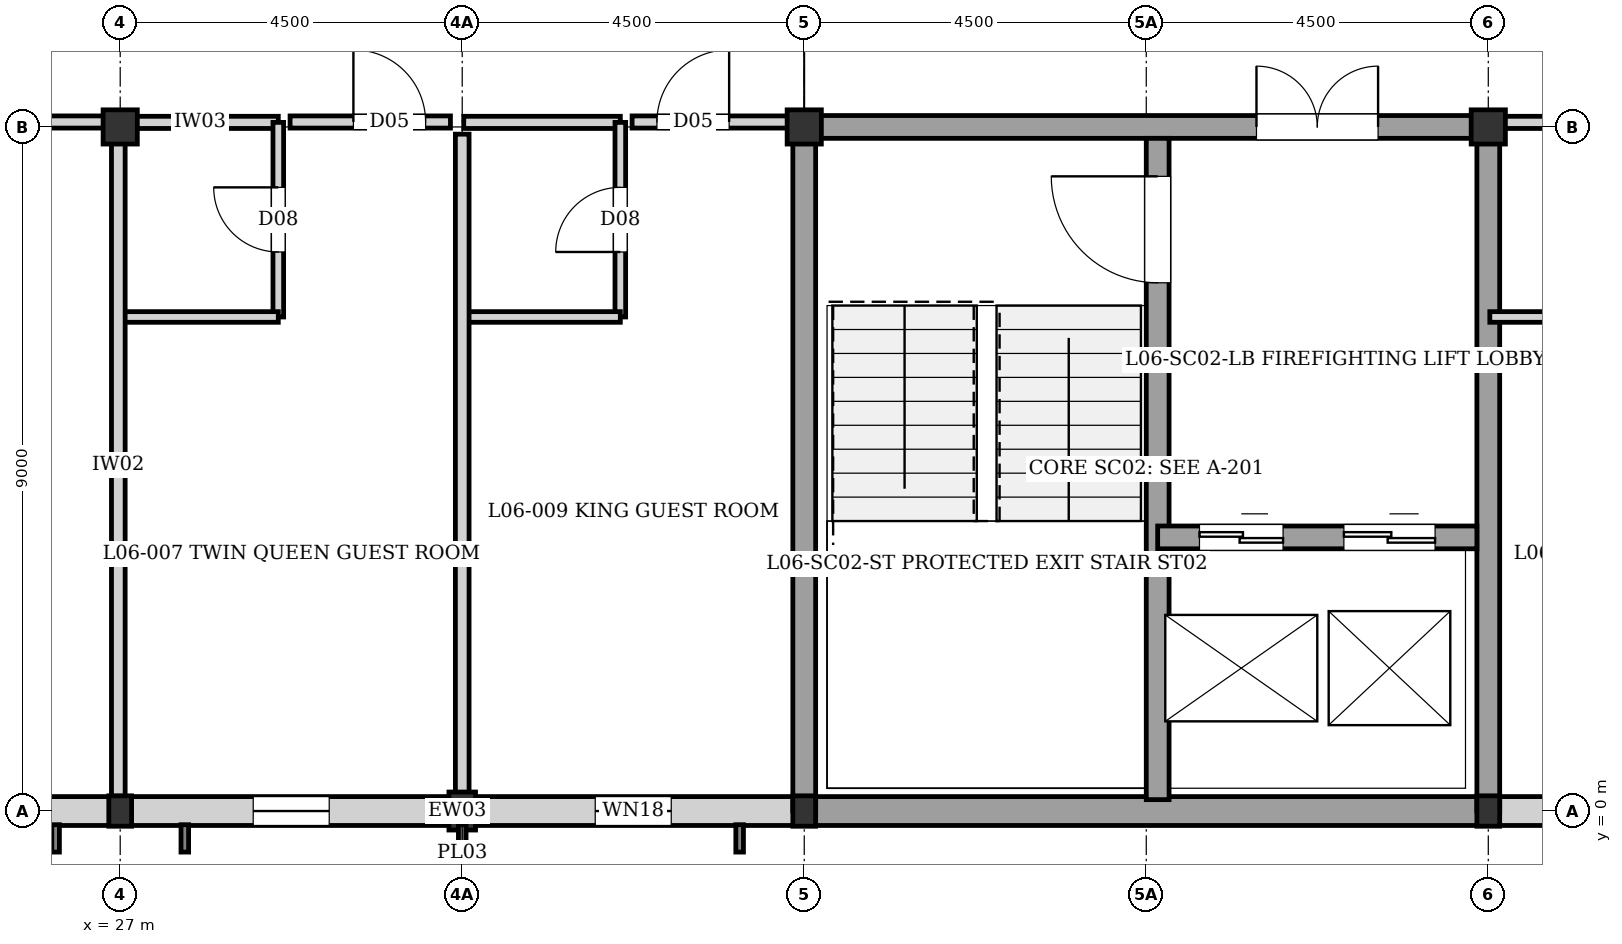
"""IFC4 building model, lengths in metres.
Left out: names, types, materials, properties, quantities, classifications, styles, units other than length and angle.
Written with IfcOpenShell. Run it as: python <this file> out.ifc"""

import sys

from ifc_helpers import new_model, si_unit, direction, frame, frame_2d, origin, origin_2d, place, context, subcontext, project, spatial, rectangle, i_section, extrude, element, fill, save


model = new_model("IFC4")
c1 = context("Model", 3, precision=1e-05, world=origin(), true_north=direction((0.0, 1.0)))
c2 = subcontext(c1, "Body", "Model", "MODEL_VIEW")
j1 = project(units=[si_unit("LENGTHUNIT", "METRE"), si_unit("PLANEANGLEUNIT", "RADIAN")], contexts=[c1])
p1 = place(None, origin())
s1 = spatial("IfcSite", under=j1, at=p1, CompositionType="ELEMENT")
p2 = place(p1, origin())
s2 = spatial("IfcBuilding", under=s1, at=p2, CompositionType="ELEMENT")
p3 = place(p2, frame((0.0, 0.0, 20.64)))
s3 = spatial("IfcBuildingStorey", under=s2, at=p3, CompositionType="ELEMENT", Elevation=20.64)
p4 = place(p3, frame((27.0, 0.0, 0.0), z_axis=(0.0, 0.0, 1.0), x_axis=(1.0, 0.0, 0.0)))
e1 = element("IfcColumn", 1, at=p4, inside=s3, PredefinedType="COLUMN", context=c2, shape_type="SweptSolid", body=[
    extrude(i_section(OverallWidth=0.3, OverallDepth=0.4, WebThickness=0.013, FlangeThickness=0.024, at=origin_2d()), origin(), (0.0, 0.0, 1.0), 3.04),
])
p5 = place(p3, frame((27.0, 9.0, 0.0), z_axis=(0.0, 0.0, 1.0), x_axis=(1.0, 0.0, 0.0)))
e2 = element("IfcColumn", 2, at=p5, inside=s3, PredefinedType="COLUMN", context=c2, shape_type="SweptSolid", body=[
    extrude(rectangle(XDim=0.45, YDim=0.45, at=origin_2d()), origin(), (0.0, 0.0, 1.0), 3.04),
])
p6 = place(p3, frame((36.0, 0.0, 0.0), z_axis=(0.0, 0.0, 1.0), x_axis=(1.0, 0.0, 0.0)))
e3 = element("IfcColumn", 3, at=p6, inside=s3, PredefinedType="COLUMN", context=c2, shape_type="SweptSolid", body=[
    extrude(i_section(OverallWidth=0.3, OverallDepth=0.4, WebThickness=0.013, FlangeThickness=0.024, at=origin_2d()), origin(), (0.0, 0.0, 1.0), 3.04),
])
p7 = place(p3, frame((36.0, 9.0, 0.0), z_axis=(0.0, 0.0, 1.0), x_axis=(1.0, 0.0, 0.0)))
e4 = element("IfcColumn", 4, at=p7, inside=s3, PredefinedType="COLUMN", context=c2, shape_type="SweptSolid", body=[
    extrude(rectangle(XDim=0.45, YDim=0.45, at=origin_2d()), origin(), (0.0, 0.0, 1.0), 3.04),
])
p8 = place(p3, frame((45.0, 0.0, 0.0), z_axis=(0.0, 0.0, 1.0), x_axis=(1.0, 0.0, 0.0)))
e5 = element("IfcColumn", 5, at=p8, inside=s3, PredefinedType="COLUMN", context=c2, shape_type="SweptSolid", body=[
    extrude(i_section(OverallWidth=0.3, OverallDepth=0.4, WebThickness=0.013, FlangeThickness=0.024, at=origin_2d()), origin(), (0.0, 0.0, 1.0), 3.04),
])
p9 = place(p3, frame((45.0, 9.0, 0.0), z_axis=(0.0, 0.0, 1.0), x_axis=(1.0, 0.0, 0.0)))
e6 = element("IfcColumn", 6, at=p9, inside=s3, PredefinedType="COLUMN", context=c2, shape_type="SweptSolid", body=[
    extrude(rectangle(XDim=0.45, YDim=0.45, at=origin_2d()), origin(), (0.0, 0.0, 1.0), 3.04),
])
p10 = place(p3, frame((31.5, 0.0, 0.0), z_axis=(0.0, 0.0, 1.0), x_axis=(1.0, 0.0, 0.0)))
e7 = element("IfcColumn", 7, at=p10, inside=s3, PredefinedType="PILASTER", context=c2, shape_type="SweptSolid", body=[
    extrude(rectangle(XDim=0.35, YDim=0.5, at=origin_2d()), origin(), (0.0, 0.0, 1.0), 3.04),
])
p11 = place(p3, frame((53.87, 0.0, 0.0), z_axis=(0.0, 0.0, 1.0), x_axis=(-1.0, 0.0, 0.0)))
e8 = element("IfcWall", 8, at=p11, inside=s3, PredefinedType="SOLIDWALL", context=c2, shape_type="SweptSolid", body=[
    extrude(rectangle(XDim=8.74, YDim=0.38, at=frame_2d((4.37, 0.0))), origin(), (0.0, 0.0, 1.0), 2.48),
])
p12 = place(p11, frame((1.62, 0.0, 0.35)))
e9 = element("IfcOpeningElement", 9, at=p12, cuts=e8, PredefinedType="OPENING", context=c2, shape_type="SweptSolid", body=[
    extrude(rectangle(XDim=1.0, YDim=1.6, at=frame_2d((0.5, 0.8))), frame((0.0, 0.2, 0.0), z_axis=(0.0, -1.0, 0.0), x_axis=(1.0, 0.0, 0.0)), (0.0, 0.0, 1.0), 0.4),
])
p13 = place(p11, frame((6.12, 0.0, 0.35)))
e10 = element("IfcOpeningElement", 10, at=p13, cuts=e8, PredefinedType="OPENING", context=c2, shape_type="SweptSolid", body=[
    extrude(rectangle(XDim=1.0, YDim=1.6, at=frame_2d((0.5, 0.8))), frame((0.0, 0.2, 0.0), z_axis=(0.0, -1.0, 0.0), x_axis=(1.0, 0.0, 0.0)), (0.0, 0.0, 1.0), 0.4),
])
p14 = place(p3, frame((45.0, 0.0, 0.0), z_axis=(0.0, 0.0, 1.0), x_axis=(-1.0, 0.0, 0.0)))
e11 = element("IfcWall", 11, at=p14, inside=s3, PredefinedType="SOLIDWALL", context=c2, shape_type="SweptSolid", body=[
    extrude(rectangle(XDim=9.0, YDim=0.38, at=frame_2d((4.5, 0.0))), origin(), (0.0, 0.0, 1.0), 2.82),
])
p15 = place(p3, frame((35.87, 0.0, 0.0), z_axis=(0.0, 0.0, 1.0), x_axis=(-1.0, 0.0, 0.0)))
e12 = element("IfcWall", 12, at=p15, inside=s3, PredefinedType="SOLIDWALL", context=c2, shape_type="SweptSolid", body=[
    extrude(rectangle(XDim=8.87, YDim=0.38, at=frame_2d((4.435, 0.0))), origin(), (0.0, 0.0, 1.0), 2.38),
])
p16 = place(p15, frame((1.62, 0.0, 0.35)))
e13 = element("IfcOpeningElement", 13, at=p16, cuts=e12, PredefinedType="OPENING", context=c2, shape_type="SweptSolid", body=[
    extrude(rectangle(XDim=1.0, YDim=1.6, at=frame_2d((0.5, 0.8))), frame((0.0, 0.2, 0.0), z_axis=(0.0, -1.0, 0.0), x_axis=(1.0, 0.0, 0.0)), (0.0, 0.0, 1.0), 0.4),
])
p17 = place(p15, frame((6.12, 0.0, 0.35)))
e14 = element("IfcOpeningElement", 14, at=p17, cuts=e12, PredefinedType="OPENING", context=c2, shape_type="SweptSolid", body=[
    extrude(rectangle(XDim=1.0, YDim=1.6, at=frame_2d((0.5, 0.8))), frame((0.0, 0.2, 0.0), z_axis=(0.0, -1.0, 0.0), x_axis=(1.0, 0.0, 0.0)), (0.0, 0.0, 1.0), 0.4),
])
p18 = place(p3, frame((27.0, 0.0, 0.0), z_axis=(0.0, 0.0, 1.0), x_axis=(-1.0, 0.0, 0.0)))
e15 = element("IfcWall", 15, at=p18, inside=s3, PredefinedType="SOLIDWALL", context=c2, shape_type="SweptSolid", body=[
    extrude(rectangle(XDim=8.87, YDim=0.38, at=frame_2d((4.435, 0.0))), origin(), (0.0, 0.0, 1.0), 2.42),
])
p19 = place(p18, frame((1.75, 0.0, 0.35)))
e16 = element("IfcOpeningElement", 16, at=p19, cuts=e15, PredefinedType="OPENING", context=c2, shape_type="SweptSolid", body=[
    extrude(rectangle(XDim=1.0, YDim=1.6, at=frame_2d((0.5, 0.8))), frame((0.0, 0.2, 0.0), z_axis=(0.0, -1.0, 0.0), x_axis=(1.0, 0.0, 0.0)), (0.0, 0.0, 1.0), 0.4),
])
p20 = place(p18, frame((6.25, 0.0, 0.35)))
e17 = element("IfcOpeningElement", 17, at=p20, cuts=e15, PredefinedType="OPENING", context=c2, shape_type="SweptSolid", body=[
    extrude(rectangle(XDim=1.0, YDim=1.6, at=frame_2d((0.5, 0.8))), frame((0.0, 0.2, 0.0), z_axis=(0.0, -1.0, 0.0), x_axis=(1.0, 0.0, 0.0)), (0.0, 0.0, 1.0), 0.4),
])
p21 = place(p3, frame((45.0, 0.0, 0.0), z_axis=(0.0, 0.0, 1.0), x_axis=(0.0, 1.0, 0.0)))
e18 = element("IfcWall", 18, at=p21, inside=s3, PredefinedType="SHEAR", context=c2, shape_type="SweptSolid", body=[
    extrude(rectangle(XDim=9.0, YDim=0.3, at=frame_2d((4.5, 0.0))), origin(), (0.0, 0.0, 1.0), 2.82),
])
p22 = place(p3, frame((36.0, 9.0, 0.0), z_axis=(0.0, 0.0, 1.0), x_axis=(1.0, 0.0, 0.0)))
e19 = element("IfcWall", 19, at=p22, inside=s3, PredefinedType="SHEAR", context=c2, shape_type="SweptSolid", body=[
    extrude(rectangle(XDim=9.0, YDim=0.3, at=frame_2d((4.5, 0.0))), origin(), (0.0, 0.0, 1.0), 2.82),
])
p23 = place(p22, frame((5.95, 0.0, 0.0)))
e20 = element("IfcOpeningElement", 20, at=p23, cuts=e19, PredefinedType="OPENING", context=c2, shape_type="SweptSolid", body=[
    extrude(rectangle(XDim=1.6, YDim=2.1, at=frame_2d((0.8, 1.05))), frame((0.0, 0.16, 0.0), z_axis=(0.0, -1.0, 0.0), x_axis=(1.0, 0.0, 0.0)), (0.0, 0.0, 1.0), 0.32),
])
p24 = place(p3, frame((36.0, 0.0, 0.0), z_axis=(0.0, 0.0, 1.0), x_axis=(0.0, 1.0, 0.0)))
e21 = element("IfcWall", 21, at=p24, inside=s3, PredefinedType="SHEAR", context=c2, shape_type="SweptSolid", body=[
    extrude(rectangle(XDim=9.0, YDim=0.3, at=frame_2d((4.5, 0.0))), origin(), (0.0, 0.0, 1.0), 2.82),
])
p25 = place(p3, frame((40.65, 0.15, 0.0), z_axis=(0.0, 0.0, 1.0), x_axis=(0.0, 1.0, 0.0)))
e22 = element("IfcWall", 22, at=p25, inside=s3, PredefinedType="SHEAR", context=c2, shape_type="SweptSolid", body=[
    extrude(rectangle(XDim=8.7, YDim=0.3, at=frame_2d((4.35, 0.0))), origin(), (0.0, 0.0, 1.0), 2.82),
])
p26 = place(p25, frame((6.8, 0.0, 0.0)))
e23 = element("IfcOpeningElement", 23, at=p26, cuts=e22, PredefinedType="OPENING", context=c2, shape_type="SweptSolid", body=[
    extrude(rectangle(XDim=1.4, YDim=2.02, at=frame_2d((0.7, 1.01))), frame((0.0, 0.16, 0.0), z_axis=(0.0, -1.0, 0.0), x_axis=(1.0, 0.0, 0.0)), (0.0, 0.0, 1.0), 0.32),
])
p27 = place(p3, frame((40.65, 3.6, 0.0), z_axis=(0.0, 0.0, 1.0), x_axis=(1.0, 0.0, 0.0)))
e24 = element("IfcWall", 24, at=p27, inside=s3, PredefinedType="SHEAR", context=c2, shape_type="SweptSolid", body=[
    extrude(rectangle(XDim=4.2, YDim=0.3, at=frame_2d((2.1, 0.0))), origin(), (0.0, 0.0, 1.0), 2.82),
])
p28 = place(p27, frame((0.55, 0.0, 0.0)))
e25 = element("IfcOpeningElement", 25, at=p28, cuts=e24, PredefinedType="OPENING", context=c2, shape_type="SweptSolid", body=[
    extrude(rectangle(XDim=1.1, YDim=2.1, at=frame_2d((0.55, 1.05))), frame((0.0, 0.16, 0.0), z_axis=(0.0, -1.0, 0.0), x_axis=(1.0, 0.0, 0.0)), (0.0, 0.0, 1.0), 0.32),
])
p29 = place(p27, frame((2.45, 0.0, 0.0)))
e26 = element("IfcOpeningElement", 26, at=p29, cuts=e24, PredefinedType="OPENING", context=c2, shape_type="SweptSolid", body=[
    extrude(rectangle(XDim=1.2, YDim=2.2, at=frame_2d((0.6, 1.1))), frame((0.0, 0.16, 0.0), z_axis=(0.0, -1.0, 0.0), x_axis=(1.0, 0.0, 0.0)), (0.0, 0.0, 1.0), 0.32),
])
p30 = place(p3, frame((27.02, 9.06, 0.0), z_axis=(0.0, 0.0, 1.0), x_axis=(1.0, 0.0, 0.0)))
e27 = element("IfcWall", 27, at=p30, inside=s3, PredefinedType="PARTITIONING", context=c2, shape_type="SweptSolid", body=[
    extrude(rectangle(XDim=2.06, YDim=0.16, at=frame_2d((1.03, 0.0))), origin(), (0.0, 0.0, 1.0), 2.42),
])
p31 = place(p3, frame((29.08, 6.5, 0.0), z_axis=(0.0, 0.0, 1.0), x_axis=(0.0, 1.0, 0.0)))
e28 = element("IfcWall", 28, at=p31, inside=s3, PredefinedType="PLUMBINGWALL", context=c2, shape_type="SweptSolid", body=[
    extrude(rectangle(XDim=2.56, YDim=0.14, at=frame_2d((1.28, 0.0))), origin(), (0.0, 0.0, 1.0), 2.82),
])
p32 = place(p31, frame((0.855, 0.0, 0.0)))
e29 = element("IfcOpeningElement", 29, at=p32, cuts=e28, PredefinedType="OPENING", context=c2, shape_type="SweptSolid", body=[
    extrude(rectangle(XDim=0.85, YDim=2.04, at=frame_2d((0.425, 1.02))), frame((0.0, 0.08, 0.0), z_axis=(0.0, -1.0, 0.0), x_axis=(1.0, 0.0, 0.0)), (0.0, 0.0, 1.0), 0.16),
])
p33 = place(p3, frame((27.02, 6.5, 0.0), z_axis=(0.0, 0.0, 1.0), x_axis=(1.0, 0.0, 0.0)))
e30 = element("IfcWall", 30, at=p33, inside=s3, PredefinedType="PLUMBINGWALL", context=c2, shape_type="SweptSolid", body=[
    extrude(rectangle(XDim=2.06, YDim=0.14, at=frame_2d((1.03, 0.0))), origin(), (0.0, 0.0, 1.0), 2.82),
])
p34 = place(p3, frame((31.52, 9.06, 0.0), z_axis=(0.0, 0.0, 1.0), x_axis=(1.0, 0.0, 0.0)))
e31 = element("IfcWall", 31, at=p34, inside=s3, PredefinedType="PARTITIONING", context=c2, shape_type="SweptSolid", body=[
    extrude(rectangle(XDim=2.06, YDim=0.16, at=frame_2d((1.03, 0.0))), origin(), (0.0, 0.0, 1.0), 2.42),
])
p35 = place(p3, frame((33.58, 6.5, 0.0), z_axis=(0.0, 0.0, 1.0), x_axis=(0.0, 1.0, 0.0)))
e32 = element("IfcWall", 32, at=p35, inside=s3, PredefinedType="PLUMBINGWALL", context=c2, shape_type="SweptSolid", body=[
    extrude(rectangle(XDim=2.56, YDim=0.14, at=frame_2d((1.28, 0.0))), origin(), (0.0, 0.0, 1.0), 2.82),
])
p36 = place(p35, frame((0.855, 0.0, 0.0)))
e33 = element("IfcOpeningElement", 33, at=p36, cuts=e32, PredefinedType="OPENING", context=c2, shape_type="SweptSolid", body=[
    extrude(rectangle(XDim=0.85, YDim=2.04, at=frame_2d((0.425, 1.02))), frame((0.0, 0.08, 0.0), z_axis=(0.0, -1.0, 0.0), x_axis=(1.0, 0.0, 0.0)), (0.0, 0.0, 1.0), 0.16),
])
p37 = place(p3, frame((31.52, 6.5, 0.0), z_axis=(0.0, 0.0, 1.0), x_axis=(1.0, 0.0, 0.0)))
e34 = element("IfcWall", 34, at=p37, inside=s3, PredefinedType="PLUMBINGWALL", context=c2, shape_type="SweptSolid", body=[
    extrude(rectangle(XDim=2.06, YDim=0.14, at=frame_2d((1.03, 0.0))), origin(), (0.0, 0.0, 1.0), 2.82),
])
p38 = place(p3, frame((45.02, 9.06, 0.0), z_axis=(0.0, 0.0, 1.0), x_axis=(1.0, 0.0, 0.0)))
e35 = element("IfcWall", 35, at=p38, inside=s3, PredefinedType="PARTITIONING", context=c2, shape_type="SweptSolid", body=[
    extrude(rectangle(XDim=2.06, YDim=0.16, at=frame_2d((1.03, 0.0))), origin(), (0.0, 0.0, 1.0), 2.33),
])
p39 = place(p3, frame((45.02, 6.5, 0.0), z_axis=(0.0, 0.0, 1.0), x_axis=(1.0, 0.0, 0.0)))
e36 = element("IfcWall", 36, at=p39, inside=s3, PredefinedType="PLUMBINGWALL", context=c2, shape_type="SweptSolid", body=[
    extrude(rectangle(XDim=2.06, YDim=0.14, at=frame_2d((1.03, 0.0))), origin(), (0.0, 0.0, 1.0), 2.82),
])
p40 = place(p3, frame((26.975, 0.195, 0.0), z_axis=(0.0, 0.0, 1.0), x_axis=(0.0, 1.0, 0.0)))
e37 = element("IfcWall", 37, at=p40, inside=s3, PredefinedType="PARTITIONING", context=c2, shape_type="SweptSolid", body=[
    extrude(rectangle(XDim=8.71, YDim=0.18, at=frame_2d((4.355, 0.0))), origin(), (0.0, 0.0, 1.0), 2.29),
])
p41 = place(p3, frame((31.5, 0.195, 0.0), z_axis=(0.0, 0.0, 1.0), x_axis=(0.0, 1.0, 0.0)))
e38 = element("IfcWall", 38, at=p41, inside=s3, PredefinedType="PARTITIONING", context=c2, shape_type="SweptSolid", body=[
    extrude(rectangle(XDim=8.71, YDim=0.18, at=frame_2d((4.355, 0.0))), origin(), (0.0, 0.0, 1.0), 2.82),
])
p42 = place(p3, frame((20.285, 9.065, 0.0), z_axis=(0.0, 0.0, 1.0), x_axis=(1.0, 0.0, 0.0)))
e39 = element("IfcWall", 39, at=p42, inside=s3, PredefinedType="PARTITIONING", context=c2, shape_type="SweptSolid", body=[
    extrude(rectangle(XDim=6.535, YDim=0.16, at=frame_2d((3.268, 0.0))), origin(), (0.0, 0.0, 1.0), 2.29),
])
p43 = place(p42, frame((1.75, 0.0, 0.0)))
e40 = element("IfcOpeningElement", 40, at=p43, cuts=e39, PredefinedType="OPENING", context=c2, shape_type="SweptSolid", body=[
    extrude(rectangle(XDim=1.3, YDim=2.25, at=frame_2d((0.65, 1.125))), frame((0.0, 0.09, 0.0), z_axis=(0.0, -1.0, 0.0), x_axis=(1.0, 0.0, 0.0)), (0.0, 0.0, 1.0), 0.18),
])
p44 = place(p3, frame((29.235, 9.065, 0.0), z_axis=(0.0, 0.0, 1.0), x_axis=(1.0, 0.0, 0.0)))
e41 = element("IfcWall", 41, at=p44, inside=s3, PredefinedType="PARTITIONING", context=c2, shape_type="SweptSolid", body=[
    extrude(rectangle(XDim=2.11, YDim=0.16, at=frame_2d((1.055, 0.0))), origin(), (0.0, 0.0, 1.0), 2.42),
])
p45 = place(p44, frame((0.833, 0.0, 0.0)))
e42 = element("IfcOpeningElement", 42, at=p45, cuts=e41, PredefinedType="OPENING", context=c2, shape_type="SweptSolid", body=[
    extrude(rectangle(XDim=0.95, YDim=2.15, at=frame_2d((0.475, 1.075))), frame((0.0, 0.09, 0.0), z_axis=(0.0, -1.0, 0.0), x_axis=(1.0, 0.0, 0.0)), (0.0, 0.0, 1.0), 0.18),
])
p46 = place(p3, frame((33.735, 9.065, 0.0), z_axis=(0.0, 0.0, 1.0), x_axis=(1.0, 0.0, 0.0)))
e43 = element("IfcWall", 43, at=p46, inside=s3, PredefinedType="PARTITIONING", context=c2, shape_type="SweptSolid", body=[
    extrude(rectangle(XDim=2.11, YDim=0.16, at=frame_2d((1.055, 0.0))), origin(), (0.0, 0.0, 1.0), 2.42),
])
p47 = place(p46, frame((0.327, 0.0, 0.0)))
e44 = element("IfcOpeningElement", 44, at=p47, cuts=e43, PredefinedType="OPENING", context=c2, shape_type="SweptSolid", body=[
    extrude(rectangle(XDim=0.95, YDim=2.15, at=frame_2d((0.475, 1.075))), frame((0.0, 0.09, 0.0), z_axis=(0.0, -1.0, 0.0), x_axis=(1.0, 0.0, 0.0)), (0.0, 0.0, 1.0), 0.18),
])
p48 = place(p16, origin())
e45 = element("IfcWindow", 45, at=p48, inside=s3, PartitioningType="SINGLE_PANEL", PredefinedType="WINDOW", context=c2, shape_type="SweptSolid", body=[
    extrude(rectangle(XDim=1.0, YDim=1.6, at=frame_2d((0.5, 0.8))), frame((0.0, 0.03, 0.0), z_axis=(0.0, -1.0, 0.0), x_axis=(1.0, 0.0, 0.0)), (0.0, 0.0, 1.0), 0.06),
])
fill(e13, e45)
p49 = place(p17, origin())
e46 = element("IfcWindow", 46, at=p49, inside=s3, PartitioningType="SINGLE_PANEL", PredefinedType="WINDOW", context=c2, shape_type="SweptSolid", body=[
    extrude(rectangle(XDim=1.0, YDim=1.6, at=frame_2d((0.5, 0.8))), frame((0.0, 0.03, 0.0), z_axis=(0.0, -1.0, 0.0), x_axis=(1.0, 0.0, 0.0)), (0.0, 0.0, 1.0), 0.06),
])
fill(e14, e46)
p50 = place(p23, origin())
e47 = element("IfcDoor", 47, at=p50, inside=s3, OperationType="DOUBLE_DOOR_SINGLE_SWING", PredefinedType="DOOR", context=c2, shape_type="SweptSolid", body=[
    extrude(rectangle(XDim=1.6, YDim=2.1, at=frame_2d((0.8, 1.05))), frame((0.0, 0.025, 0.0), z_axis=(0.0, -1.0, 0.0), x_axis=(1.0, 0.0, 0.0)), (0.0, 0.0, 1.0), 0.05),
])
fill(e20, e47)
p51 = place(p26, origin())
e48 = element("IfcDoor", 48, at=p51, inside=s3, OperationType="SINGLE_SWING_RIGHT", PredefinedType="DOOR", context=c2, shape_type="SweptSolid", body=[
    extrude(rectangle(XDim=1.4, YDim=2.02, at=frame_2d((0.7, 1.01))), frame((0.0, 0.025, 0.0), z_axis=(0.0, -1.0, 0.0), x_axis=(1.0, 0.0, 0.0)), (0.0, 0.0, 1.0), 0.05),
])
fill(e23, e48)
p52 = place(p28, origin())
e49 = element("IfcDoor", 49, at=p52, inside=s3, OperationType="DOUBLE_DOOR_SLIDING", PredefinedType="DOOR", context=c2, shape_type="SweptSolid", body=[
    extrude(rectangle(XDim=1.1, YDim=2.1, at=frame_2d((0.55, 1.05))), frame((0.0, 0.025, 0.0), z_axis=(0.0, -1.0, 0.0), x_axis=(1.0, 0.0, 0.0)), (0.0, 0.0, 1.0), 0.05),
])
fill(e25, e49)
p53 = place(p29, origin())
e50 = element("IfcDoor", 50, at=p53, inside=s3, OperationType="DOUBLE_DOOR_SLIDING", PredefinedType="DOOR", context=c2, shape_type="SweptSolid", body=[
    extrude(rectangle(XDim=1.2, YDim=2.2, at=frame_2d((0.6, 1.1))), frame((0.0, 0.025, 0.0), z_axis=(0.0, -1.0, 0.0), x_axis=(1.0, 0.0, 0.0)), (0.0, 0.0, 1.0), 0.05),
])
fill(e26, e50)
p54 = place(p32, origin())
e51 = element("IfcDoor", 51, at=p54, inside=s3, OperationType="SINGLE_SWING_RIGHT", PredefinedType="DOOR", context=c2, shape_type="SweptSolid", body=[
    extrude(rectangle(XDim=0.85, YDim=2.04, at=frame_2d((0.425, 1.02))), frame((0.0, 0.025, 0.0), z_axis=(0.0, -1.0, 0.0), x_axis=(1.0, 0.0, 0.0)), (0.0, 0.0, 1.0), 0.05),
])
fill(e29, e51)
p55 = place(p36, origin())
e52 = element("IfcDoor", 52, at=p55, inside=s3, OperationType="SINGLE_SWING_LEFT", PredefinedType="DOOR", context=c2, shape_type="SweptSolid", body=[
    extrude(rectangle(XDim=0.85, YDim=2.04, at=frame_2d((0.425, 1.02))), frame((0.0, 0.025, 0.0), z_axis=(0.0, -1.0, 0.0), x_axis=(1.0, 0.0, 0.0)), (0.0, 0.0, 1.0), 0.05),
])
fill(e33, e52)
p56 = place(p45, origin())
e53 = element("IfcDoor", 53, at=p56, inside=s3, OperationType="SINGLE_SWING_LEFT", PredefinedType="DOOR", context=c2, shape_type="SweptSolid", body=[
    extrude(rectangle(XDim=0.95, YDim=2.15, at=frame_2d((0.475, 1.075))), frame((0.0, 0.025, 0.0), z_axis=(0.0, -1.0, 0.0), x_axis=(1.0, 0.0, 0.0)), (0.0, 0.0, 1.0), 0.05),
])
fill(e42, e53)
p57 = place(p47, origin())
e54 = element("IfcDoor", 54, at=p57, inside=s3, OperationType="SINGLE_SWING_RIGHT", PredefinedType="DOOR", context=c2, shape_type="SweptSolid", body=[
    extrude(rectangle(XDim=0.95, YDim=2.15, at=frame_2d((0.475, 1.075))), frame((0.0, 0.025, 0.0), z_axis=(0.0, -1.0, 0.0), x_axis=(1.0, 0.0, 0.0)), (0.0, 0.0, 1.0), 0.05),
])
fill(e44, e54)
save(model, sys.argv[1])
